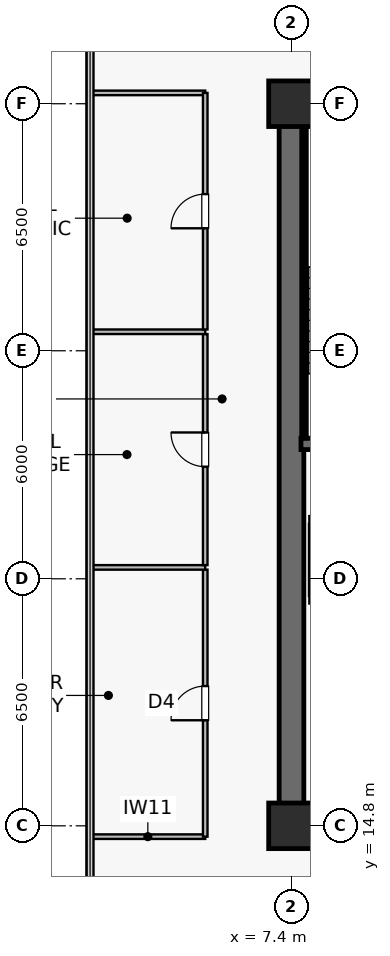
"""IFC4 building model, lengths in metres.
Left out: names, types, materials, properties, quantities, classifications, styles, units other than length and angle.
Written with IfcOpenShell. Run it as: python <this file> out.ifc"""

import sys

from ifc_helpers import new_model, si_unit, direction, frame, frame_2d, origin, origin_2d, place, context, subcontext, project, spatial, rectangle, extrude, source, transform, mapped, element, fill, save


model = new_model("IFC4")
c1 = context("Model", 3, precision=1e-05, world=origin(), true_north=direction((0.0, 1.0)))
c2 = subcontext(c1, "Body", "Model", "MODEL_VIEW")
j1 = project(units=[si_unit("LENGTHUNIT", "METRE"), si_unit("PLANEANGLEUNIT", "RADIAN")], contexts=[c1])
p1 = place(None, origin())
s1 = spatial("IfcSite", under=j1, at=p1, CompositionType="ELEMENT")
p2 = place(p1, origin())
s2 = spatial("IfcBuilding", under=s1, at=p2, CompositionType="ELEMENT")
p3 = place(p2, frame((0.0, 0.0, 158.4)))
s3 = spatial("IfcBuildingStorey", under=s2, at=p3, CompositionType="ELEMENT", Elevation=158.4)
p4 = place(p3, frame((7.075, 14.8, 0.0), z_axis=(0.0, 0.0, 1.0), x_axis=(1.0, 0.0, 0.0)))
e1 = element("IfcWall", 1, at=p4, inside=s3, PredefinedType="SHEAR", context=c2, shape_type="SweptSolid", body=[
    extrude(rectangle(XDim=15.45, YDim=0.65, at=frame_2d((7.725, 0.0))), origin(), (0.0, 0.0, 1.0), 3.79),
])
p5 = place(p3, frame((7.075, 33.8, 0.0), z_axis=(0.0, 0.0, 1.0), x_axis=(1.0, 0.0, 0.0)))
e2 = element("IfcWall", 2, at=p5, inside=s3, PredefinedType="SHEAR", context=c2, shape_type="SweptSolid", body=[
    extrude(rectangle(XDim=15.45, YDim=0.65, at=frame_2d((7.725, 0.0))), origin(), (0.0, 0.0, 1.0), 3.79),
])
p6 = place(p5, frame((8.375, 0.0, 0.0)))
e3 = element("IfcOpeningElement", 3, at=p6, cuts=e2, PredefinedType="OPENING", context=c2, shape_type="SweptSolid", body=[
    extrude(rectangle(XDim=0.95, YDim=2.15, at=frame_2d((0.475, 1.075))), frame((0.0, 0.335, 0.0), z_axis=(0.0, -1.0, 0.0), x_axis=(1.0, 0.0, 0.0)), (0.0, 0.0, 1.0), 0.67),
])
p7 = place(p5, frame((11.915, 0.0, 0.0)))
e4 = element("IfcOpeningElement", 4, at=p7, cuts=e2, PredefinedType="OPENING", context=c2, shape_type="SweptSolid", body=[
    extrude(rectangle(XDim=0.95, YDim=2.15, at=frame_2d((0.475, 1.075))), frame((0.0, 0.335, 0.0), z_axis=(0.0, -1.0, 0.0), x_axis=(1.0, 0.0, 0.0)), (0.0, 0.0, 1.0), 0.67),
])
p8 = place(p3, frame((7.4, 15.125, 0.0), z_axis=(0.0, 0.0, 1.0), x_axis=(0.0, 1.0, 0.0)))
e5 = element("IfcWall", 5, at=p8, inside=s3, PredefinedType="SHEAR", context=c2, shape_type="SweptSolid", body=[
    extrude(rectangle(XDim=18.35, YDim=0.65, at=frame_2d((9.175, 0.0))), origin(), (0.0, 0.0, 1.0), 3.79),
])
p9 = place(p3, frame((7.65, 24.85, 0.0), z_axis=(0.0, 0.0, 1.0), x_axis=(1.0, 0.0, 0.0)))
e6 = element("IfcWall", 6, at=p9, inside=s3, PredefinedType="SHEAR", context=c2, shape_type="SweptSolid", body=[
    extrude(rectangle(XDim=3.8, YDim=0.3, at=frame_2d((1.9, 0.0))), origin(), (0.0, 0.0, 1.0), 3.79),
])
p10 = place(p3, frame((7.73, 33.4, 0.0), z_axis=(0.0, 0.0, 1.0), x_axis=(1.0, 0.0, 0.0)))
e7 = element("IfcWall", 7, at=p10, inside=s3, PredefinedType="SOLIDWALL", context=c2, shape_type="SweptSolid", body=[
    extrude(rectangle(XDim=3.72, YDim=0.12, at=frame_2d((1.86, 0.0))), origin(), (0.0, 0.0, 1.0), 3.79),
])
p11 = place(p3, frame((7.73, 25.0, 0.0), z_axis=(0.0, 0.0, 1.0), x_axis=(0.0, 1.0, 0.0)))
e8 = element("IfcWall", 8, at=p11, inside=s3, PredefinedType="SOLIDWALL", context=c2, shape_type="SweptSolid", body=[
    extrude(rectangle(XDim=8.32, YDim=0.12, at=frame_2d((4.16, 0.0))), origin(), (0.0, 0.0, 1.0), 3.79),
])
m1 = source(origin(), c2, "Body", "SweptSolid", [
    extrude(rectangle(XDim=1.2, YDim=1.2, at=origin_2d()), origin(), (0.0, 0.0, 1.0), 4.1),
])
for number, where, z_axis, x_axis in (
    (9, (7.4, 14.8, 0.0), (0.0, 0.0, 1.0), (1.0, 0.0, 0.0)),
    (10, (7.4, 33.8, 0.0), (0.0, 0.0, 1.0), (1.0, 0.0, 0.0)),
):
    element("IfcColumn", number, at=place(p3, frame(where, z_axis=z_axis, x_axis=x_axis)), inside=s3, PredefinedType="COLUMN", context=c2, shape_type="MappedRepresentation", body=[
        mapped(m1, transform((0.0, 0.0, 0.0), scale=1.0)),
    ])
for number, where, z_axis, x_axis in (
    (11, (7.87, 20.75, 0.0), (0.0, 0.0, 1.0), (1.0, 0.0, 0.0)),
    (12, (7.87, 22.85, 0.0), (0.0, 0.0, 1.0), (1.0, 0.0, 0.0)),
):
    element("IfcWall", number, at=place(p3, frame(where, z_axis=z_axis, x_axis=x_axis)), inside=s3, PredefinedType="SOLIDWALL", context=c2, shape_type="SweptSolid", body=[
        extrude(rectangle(XDim=2.26, YDim=0.2, at=frame_2d((1.13, 0.0))), origin(), (0.0, 0.0, 1.0), 3.79),
    ])
p12 = place(p3, frame((7.95, 20.85, 0.0), z_axis=(0.0, 0.0, 1.0), x_axis=(0.0, 1.0, 0.0)))
e13 = element("IfcWall", 13, at=p12, inside=s3, PredefinedType="SOLIDWALL", context=c2, shape_type="SweptSolid", body=[
    extrude(rectangle(XDim=1.9, YDim=0.18, at=frame_2d((0.95, 0.0))), origin(), (0.0, 0.0, 1.0), 3.79),
])
for number, where, z_axis, x_axis in (
    (14, (2.11, 14.515, 0.0), (0.0, 0.0, 1.0), (1.0, 0.0, 0.0)),
    (15, (2.11, 34.085, 0.0), (0.0, 0.0, 1.0), (1.0, 0.0, 0.0)),
):
    element("IfcWall", number, at=place(p3, frame(where, z_axis=z_axis, x_axis=x_axis)), inside=s3, PredefinedType="PARTITIONING", context=c2, shape_type="SweptSolid", body=[
        extrude(rectangle(XDim=3.02, YDim=0.12, at=frame_2d((1.51, 0.0))), origin(), (0.0, 0.0, 1.0), 3.79),
    ])
p13 = place(p3, frame((5.13, 14.515, 0.0), z_axis=(0.0, 0.0, 1.0), x_axis=(0.0, 1.0, 0.0)))
e16 = element("IfcWall", 16, at=p13, inside=s3, PredefinedType="PARTITIONING", context=c2, shape_type="SweptSolid", body=[
    extrude(rectangle(XDim=7.025, YDim=0.12, at=frame_2d((3.513, 0.0))), origin(), (0.0, 0.0, 1.0), 3.79),
])
p14 = place(p13, frame((3.062, 0.0, 0.0)))
e17 = element("IfcOpeningElement", 17, at=p14, cuts=e16, PredefinedType="OPENING", context=c2, shape_type="SweptSolid", body=[
    extrude(rectangle(XDim=0.9, YDim=2.1, at=frame_2d((0.45, 1.05))), frame((0.0, 0.07, 0.0), z_axis=(0.0, -1.0, 0.0), x_axis=(1.0, 0.0, 0.0)), (0.0, 0.0, 1.0), 0.14),
])
p15 = place(p3, frame((2.11, 21.6, 0.0), z_axis=(0.0, 0.0, 1.0), x_axis=(1.0, 0.0, 0.0)))
e18 = element("IfcWall", 18, at=p15, inside=s3, PredefinedType="PARTITIONING", context=c2, shape_type="SweptSolid", body=[
    extrude(rectangle(XDim=3.02, YDim=0.12, at=frame_2d((1.51, 0.0))), origin(), (0.0, 0.0, 1.0), 3.79),
])
p16 = place(p3, frame((5.13, 21.66, 0.0), z_axis=(0.0, 0.0, 1.0), x_axis=(0.0, 1.0, 0.0)))
e19 = element("IfcWall", 19, at=p16, inside=s3, PredefinedType="PARTITIONING", context=c2, shape_type="SweptSolid", body=[
    extrude(rectangle(XDim=6.08, YDim=0.12, at=frame_2d((3.04, 0.0))), origin(), (0.0, 0.0, 1.0), 3.79),
])
p17 = place(p16, frame((2.59, 0.0, 0.0)))
e20 = element("IfcOpeningElement", 20, at=p17, cuts=e19, PredefinedType="OPENING", context=c2, shape_type="SweptSolid", body=[
    extrude(rectangle(XDim=0.9, YDim=2.1, at=frame_2d((0.45, 1.05))), frame((0.0, 0.07, 0.0), z_axis=(0.0, -1.0, 0.0), x_axis=(1.0, 0.0, 0.0)), (0.0, 0.0, 1.0), 0.14),
])
p18 = place(p3, frame((2.11, 27.8, 0.0), z_axis=(0.0, 0.0, 1.0), x_axis=(1.0, 0.0, 0.0)))
e21 = element("IfcWall", 21, at=p18, inside=s3, PredefinedType="PARTITIONING", context=c2, shape_type="SweptSolid", body=[
    extrude(rectangle(XDim=3.02, YDim=0.12, at=frame_2d((1.51, 0.0))), origin(), (0.0, 0.0, 1.0), 3.79),
])
p19 = place(p3, frame((5.13, 27.86, 0.0), z_axis=(0.0, 0.0, 1.0), x_axis=(0.0, 1.0, 0.0)))
e22 = element("IfcWall", 22, at=p19, inside=s3, PredefinedType="PARTITIONING", context=c2, shape_type="SweptSolid", body=[
    extrude(rectangle(XDim=6.225, YDim=0.12, at=frame_2d((3.112, 0.0))), origin(), (0.0, 0.0, 1.0), 3.79),
])
p20 = place(p19, frame((2.663, 0.0, 0.0)))
e23 = element("IfcOpeningElement", 23, at=p20, cuts=e22, PredefinedType="OPENING", context=c2, shape_type="SweptSolid", body=[
    extrude(rectangle(XDim=0.9, YDim=2.1, at=frame_2d((0.45, 1.05))), frame((0.0, 0.07, 0.0), z_axis=(0.0, -1.0, 0.0), x_axis=(1.0, 0.0, 0.0)), (0.0, 0.0, 1.0), 0.14),
])
m2 = source(origin(), c2, "Body", "SweptSolid", [
    extrude(rectangle(XDim=0.9, YDim=2.1, at=frame_2d((0.45, 1.05))), frame((0.0, 0.025, 0.0), z_axis=(0.0, -1.0, 0.0), x_axis=(1.0, 0.0, 0.0)), (0.0, 0.0, 1.0), 0.05),
])
p21 = place(p14, origin())
e24 = element("IfcDoor", 24, at=p21, inside=s3, OperationType="SINGLE_SWING_LEFT", PredefinedType="DOOR", context=c2, shape_type="MappedRepresentation", body=[
    mapped(m2, transform((0.0, 0.0, 0.0), scale=1.0)),
])
fill(e17, e24)
p22 = place(p17, origin())
e25 = element("IfcDoor", 25, at=p22, inside=s3, OperationType="SINGLE_SWING_RIGHT", PredefinedType="DOOR", context=c2, shape_type="MappedRepresentation", body=[
    mapped(m2, transform((0.0, 0.0, 0.0), scale=1.0)),
])
fill(e20, e25)
p23 = place(p20, origin())
e26 = element("IfcDoor", 26, at=p23, inside=s3, OperationType="SINGLE_SWING_LEFT", PredefinedType="DOOR", context=c2, shape_type="MappedRepresentation", body=[
    mapped(m2, transform((0.0, 0.0, 0.0), scale=1.0)),
])
fill(e23, e26)
save(model, sys.argv[1])
